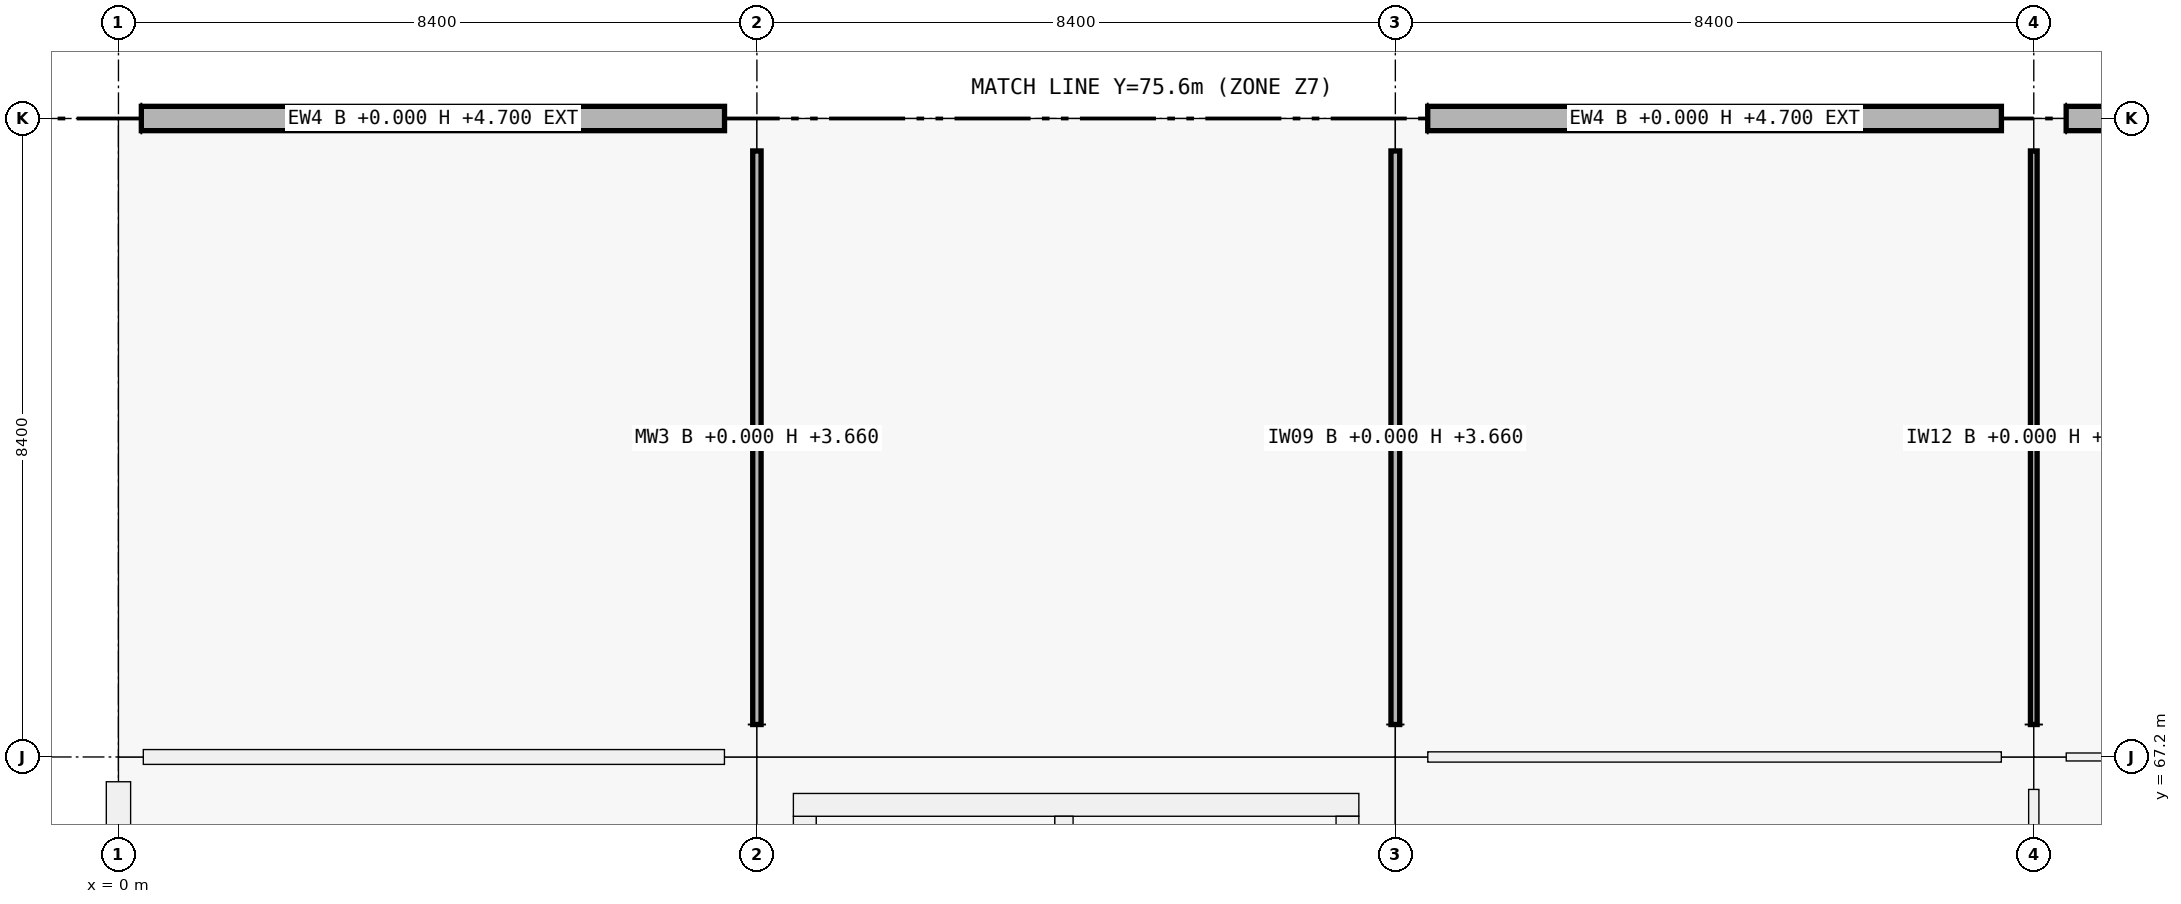
"""IFC4 building model, lengths in metres.
Left out: names, types, materials, properties, quantities, classifications, styles, units other than length and angle.
Written with IfcOpenShell. Run it as: python <this file> out.ifc"""

import sys

from ifc_helpers import new_model, si_unit, direction, frame, frame_2d, origin, origin_2d, place, context, subcontext, project, spatial, rectangle, extrude, element, fill, save


model = new_model("IFC4")
c1 = context("Model", 3, precision=1e-05, world=origin(), true_north=direction((0.0, 1.0)))
c2 = subcontext(c1, "Body", "Model", "MODEL_VIEW")
j1 = project(units=[si_unit("LENGTHUNIT", "METRE"), si_unit("PLANEANGLEUNIT", "RADIAN")], contexts=[c1])
p1 = place(None, origin())
s1 = spatial("IfcSite", under=j1, at=p1, CompositionType="ELEMENT")
p2 = place(p1, origin())
s2 = spatial("IfcBuilding", under=s1, at=p2, CompositionType="ELEMENT")
p3 = place(p2, origin())
s3 = spatial("IfcBuildingStorey", under=s2, at=p3, CompositionType="ELEMENT", Elevation=0.0)
p4 = place(p3, frame((0.0, 67.2, 0.0), z_axis=(0.0, 0.0, 1.0), x_axis=(1.0, 0.0, 0.0)))
e1 = element("IfcColumn", 1, at=p4, inside=s3, PredefinedType="COLUMN", context=c2, shape_type="SweptSolid", body=[
    extrude(rectangle(XDim=0.65, YDim=0.65, at=origin_2d()), origin(), (0.0, 0.0, 1.0), 5.76),
])
p5 = place(p3, frame((0.0, 75.6, 0.0), z_axis=(0.0, 0.0, 1.0), x_axis=(1.0, 0.0, 0.0)))
e2 = element("IfcColumn", 2, at=p5, inside=s3, PredefinedType="COLUMN", context=c2, shape_type="SweptSolid", body=[
    extrude(rectangle(XDim=0.6, YDim=0.6, at=origin_2d()), origin(), (0.0, 0.0, 1.0), 5.76),
])
for number, where, z_axis, x_axis in (
    (3, (8.4, 67.2, 0.0), (0.0, 0.0, 1.0), (1.0, 0.0, 0.0)),
    (4, (8.4, 75.6, 0.0), (0.0, 0.0, 1.0), (1.0, 0.0, 0.0)),
    (5, (16.8, 67.2, 0.0), (0.0, 0.0, 1.0), (1.0, 0.0, 0.0)),
    (6, (16.8, 75.6, 0.0), (0.0, 0.0, 1.0), (1.0, 0.0, 0.0)),
    (7, (25.2, 67.2, 0.0), (0.0, 0.0, 1.0), (1.0, 0.0, 0.0)),
    (8, (25.2, 75.6, 0.0), (0.0, 0.0, 1.0), (1.0, 0.0, 0.0)),
):
    element("IfcColumn", number, at=place(p3, frame(where, z_axis=z_axis, x_axis=x_axis)), inside=s3, PredefinedType="COLUMN", context=c2, shape_type="SweptSolid", body=[
        extrude(rectangle(XDim=0.85, YDim=0.85, at=origin_2d()), origin(), (0.0, 0.0, 1.0), 5.76),
    ])
p6 = place(p3, frame((0.0, 59.101, 0.0), z_axis=(0.0, 0.0, 1.0), x_axis=(0.0, 1.0, 0.0)))
e9 = element("IfcWall", 9, at=p6, inside=s3, PredefinedType="SOLIDWALL", context=c2, shape_type="SweptSolid", body=[
    extrude(rectangle(XDim=7.773, YDim=0.32, at=frame_2d((3.886, 0.0))), origin(), (0.0, 0.0, 1.0), 4.7),
])
p7 = place(p6, frame((3.136, 0.0, 0.9)))
e10 = element("IfcOpeningElement", 10, at=p7, cuts=e9, PredefinedType="OPENING", context=c2, shape_type="SweptSolid", body=[
    extrude(rectangle(XDim=1.5, YDim=1.8, at=frame_2d((0.75, 0.9))), frame((0.0, 0.16, 0.0), z_axis=(0.0, -1.0, 0.0), x_axis=(1.0, 0.0, 0.0)), (0.0, 0.0, 1.0), 0.32),
])
p8 = place(p6, frame((0.149, 0.0, 0.0)))
e11 = element("IfcOpeningElement", 11, at=p8, cuts=e9, PredefinedType="OPENING", context=c2, shape_type="SweptSolid", body=[
    extrude(rectangle(XDim=2.0, YDim=2.25, at=frame_2d((1.0, 1.125))), frame((0.0, 0.16, 0.0), z_axis=(0.0, -1.0, 0.0), x_axis=(1.0, 0.0, 0.0)), (0.0, 0.0, 1.0), 0.32),
])
p9 = place(p3, frame((0.301, 75.6, 0.0), z_axis=(0.0, 0.0, 1.0), x_axis=(1.0, 0.0, 0.0)))
e12 = element("IfcWall", 12, at=p9, inside=s3, PredefinedType="SOLIDWALL", context=c2, shape_type="SweptSolid", body=[
    extrude(rectangle(XDim=7.673, YDim=0.32, at=frame_2d((3.836, 0.0))), origin(), (0.0, 0.0, 1.0), 4.7),
])
p10 = place(p9, frame((3.037, 0.0, 0.9)))
e13 = element("IfcOpeningElement", 13, at=p10, cuts=e12, PredefinedType="OPENING", context=c2, shape_type="SweptSolid", body=[
    extrude(rectangle(XDim=1.6, YDim=2.1, at=frame_2d((0.8, 1.05))), frame((0.0, 0.16, 0.0), z_axis=(0.0, -1.0, 0.0), x_axis=(1.0, 0.0, 0.0)), (0.0, 0.0, 1.0), 0.32),
])
p11 = place(p3, frame((17.226, 75.6, 0.0), z_axis=(0.0, 0.0, 1.0), x_axis=(1.0, 0.0, 0.0)))
e14 = element("IfcWall", 14, at=p11, inside=s3, PredefinedType="SOLIDWALL", context=c2, shape_type="SweptSolid", body=[
    extrude(rectangle(XDim=7.548, YDim=0.32, at=frame_2d((3.774, 0.0))), origin(), (0.0, 0.0, 1.0), 4.7),
])
p12 = place(p11, frame((2.474, 0.0, 0.9)))
e15 = element("IfcOpeningElement", 15, at=p12, cuts=e14, PredefinedType="OPENING", context=c2, shape_type="SweptSolid", body=[
    extrude(rectangle(XDim=2.6, YDim=2.1, at=frame_2d((1.3, 1.05))), frame((0.0, 0.16, 0.0), z_axis=(0.0, -1.0, 0.0), x_axis=(1.0, 0.0, 0.0)), (0.0, 0.0, 1.0), 0.32),
])
p13 = place(p3, frame((25.626, 75.6, 0.0), z_axis=(0.0, 0.0, 1.0), x_axis=(1.0, 0.0, 0.0)))
e16 = element("IfcWall", 16, at=p13, inside=s3, PredefinedType="SOLIDWALL", context=c2, shape_type="SweptSolid", body=[
    extrude(rectangle(XDim=7.548, YDim=0.32, at=frame_2d((3.774, 0.0))), origin(), (0.0, 0.0, 1.0), 4.7),
])
p14 = place(p13, frame((2.374, 0.0, 0.9)))
e17 = element("IfcOpeningElement", 17, at=p14, cuts=e16, PredefinedType="OPENING", context=c2, shape_type="SweptSolid", body=[
    extrude(rectangle(XDim=2.8, YDim=1.75, at=frame_2d((1.4, 0.875))), frame((0.0, 0.16, 0.0), z_axis=(0.0, -1.0, 0.0), x_axis=(1.0, 0.0, 0.0)), (0.0, 0.0, 1.0), 0.32),
])
p15 = place(p3, frame((9.03, 59.58, 0.0), z_axis=(0.0, 0.0, 1.0), x_axis=(0.0, 1.0, 0.0)))
e18 = element("IfcWall", 18, at=p15, inside=s3, PredefinedType="SHEAR", context=c2, shape_type="SweptSolid", body=[
    extrude(rectangle(XDim=6.84, YDim=0.3, at=frame_2d((3.42, 0.0))), origin(), (0.0, 0.0, 1.0), 5.76),
])
p16 = place(p15, frame((0.12, 0.0, 0.0)))
e19 = element("IfcOpeningElement", 19, at=p16, cuts=e18, PredefinedType="OPENING", context=c2, shape_type="SweptSolid", body=[
    extrude(rectangle(XDim=1.0, YDim=2.15, at=frame_2d((0.5, 1.075))), frame((0.0, 0.15, 0.0), z_axis=(0.0, -1.0, 0.0), x_axis=(1.0, 0.0, 0.0)), (0.0, 0.0, 1.0), 0.3),
])
p17 = place(p3, frame((8.88, 66.57, 0.0), z_axis=(0.0, 0.0, 1.0), x_axis=(1.0, 0.0, 0.0)))
e20 = element("IfcWall", 20, at=p17, inside=s3, PredefinedType="SHEAR", context=c2, shape_type="SweptSolid", body=[
    extrude(rectangle(XDim=7.44, YDim=0.3, at=frame_2d((3.72, 0.0))), origin(), (0.0, 0.0, 1.0), 5.76),
])
p18 = place(p3, frame((16.17, 66.42, 0.0), z_axis=(0.0, 0.0, 1.0), x_axis=(0.0, -1.0, 0.0)))
e21 = element("IfcWall", 21, at=p18, inside=s3, PredefinedType="SHEAR", context=c2, shape_type="SweptSolid", body=[
    extrude(rectangle(XDim=6.84, YDim=0.3, at=frame_2d((3.42, 0.0))), origin(), (0.0, 0.0, 1.0), 5.76),
])
p19 = place(p3, frame((12.44, 59.58, 0.0), z_axis=(0.0, 0.0, 1.0), x_axis=(0.0, 1.0, 0.0)))
e22 = element("IfcWall", 22, at=p19, inside=s3, PredefinedType="SHEAR", context=c2, shape_type="SweptSolid", body=[
    extrude(rectangle(XDim=6.84, YDim=0.24, at=frame_2d((3.42, 0.0))), origin(), (0.0, 0.0, 1.0), 5.76),
])
p20 = place(p19, frame((0.12, 0.0, 0.0)))
e23 = element("IfcOpeningElement", 23, at=p20, cuts=e22, PredefinedType="OPENING", context=c2, shape_type="SweptSolid", body=[
    extrude(rectangle(XDim=1.0, YDim=2.15, at=frame_2d((0.5, 1.075))), frame((0.0, 0.12, 0.0), z_axis=(0.0, -1.0, 0.0), x_axis=(1.0, 0.0, 0.0)), (0.0, 0.0, 1.0), 0.24),
])
p21 = place(p3, frame((0.327, 67.2, 0.0), z_axis=(0.0, 0.0, 1.0), x_axis=(1.0, 0.0, 0.0)))
e24 = element("IfcWall", 24, at=p21, inside=s3, PredefinedType="PARTITIONING", context=c2, shape_type="SweptSolid", body=[
    extrude(rectangle(XDim=7.646, YDim=0.195, at=frame_2d((3.823, 0.0))), origin(), (0.0, 0.0, 1.0), 3.66),
])
p22 = place(p21, frame((3.313, 0.0, 0.0)))
e25 = element("IfcOpeningElement", 25, at=p22, cuts=e24, PredefinedType="OPENING", context=c2, shape_type="SweptSolid", body=[
    extrude(rectangle(XDim=1.02, YDim=2.2, at=frame_2d((0.51, 1.1))), frame((0.0, 0.098, 0.0), z_axis=(0.0, -1.0, 0.0), x_axis=(1.0, 0.0, 0.0)), (0.0, 0.0, 1.0), 0.195),
])
p23 = place(p3, frame((17.227, 67.2, 0.0), z_axis=(0.0, 0.0, 1.0), x_axis=(1.0, 0.0, 0.0)))
e26 = element("IfcWall", 26, at=p23, inside=s3, PredefinedType="PARTITIONING", context=c2, shape_type="SweptSolid", body=[
    extrude(rectangle(XDim=7.546, YDim=0.135, at=frame_2d((3.773, 0.0))), origin(), (0.0, 0.0, 1.0), 3.66),
])
p24 = place(p23, frame((3.283, 0.0, 0.0)))
e27 = element("IfcOpeningElement", 27, at=p24, cuts=e26, PredefinedType="OPENING", context=c2, shape_type="SweptSolid", body=[
    extrude(rectangle(XDim=0.98, YDim=2.18, at=frame_2d((0.49, 1.09))), frame((0.0, 0.067, 0.0), z_axis=(0.0, -1.0, 0.0), x_axis=(1.0, 0.0, 0.0)), (0.0, 0.0, 1.0), 0.135),
])
p25 = place(p3, frame((25.627, 67.2, 0.0), z_axis=(0.0, 0.0, 1.0), x_axis=(1.0, 0.0, 0.0)))
e28 = element("IfcWall", 28, at=p25, inside=s3, PredefinedType="PARTITIONING", context=c2, shape_type="SweptSolid", body=[
    extrude(rectangle(XDim=7.546, YDim=0.105, at=frame_2d((3.773, 0.0))), origin(), (0.0, 0.0, 1.0), 3.66),
])
p26 = place(p25, frame((3.248, 0.0, 0.0)))
e29 = element("IfcOpeningElement", 29, at=p26, cuts=e28, PredefinedType="OPENING", context=c2, shape_type="SweptSolid", body=[
    extrude(rectangle(XDim=1.05, YDim=2.12, at=frame_2d((0.525, 1.06))), frame((0.0, 0.052, 0.0), z_axis=(0.0, -1.0, 0.0), x_axis=(1.0, 0.0, 0.0)), (0.0, 0.0, 1.0), 0.105),
])
p27 = place(p3, frame((8.4, 67.627, 0.0), z_axis=(0.0, 0.0, 1.0), x_axis=(0.0, 1.0, 0.0)))
e30 = element("IfcWall", 30, at=p27, inside=s3, PredefinedType="MOVABLE", context=c2, shape_type="SweptSolid", body=[
    extrude(rectangle(XDim=7.546, YDim=0.11, at=frame_2d((3.773, 0.0))), origin(), (0.0, 0.0, 1.0), 3.66),
])
p28 = place(p27, frame((3.273, 0.0, 0.0)))
e31 = element("IfcOpeningElement", 31, at=p28, cuts=e30, PredefinedType="OPENING", context=c2, shape_type="SweptSolid", body=[
    extrude(rectangle(XDim=1.0, YDim=2.2, at=frame_2d((0.5, 1.1))), frame((0.0, 0.055, 0.0), z_axis=(0.0, -1.0, 0.0), x_axis=(1.0, 0.0, 0.0)), (0.0, 0.0, 1.0), 0.11),
])
p29 = place(p3, frame((16.8, 67.627, 0.0), z_axis=(0.0, 0.0, 1.0), x_axis=(0.0, 1.0, 0.0)))
e32 = element("IfcWall", 32, at=p29, inside=s3, PredefinedType="PARTITIONING", context=c2, shape_type="SweptSolid", body=[
    extrude(rectangle(XDim=7.546, YDim=0.115, at=frame_2d((3.773, 0.0))), origin(), (0.0, 0.0, 1.0), 3.66),
])
p30 = place(p29, frame((3.248, 0.0, 0.0)))
e33 = element("IfcOpeningElement", 33, at=p30, cuts=e32, PredefinedType="OPENING", context=c2, shape_type="SweptSolid", body=[
    extrude(rectangle(XDim=1.05, YDim=2.12, at=frame_2d((0.525, 1.06))), frame((0.0, 0.058, 0.0), z_axis=(0.0, -1.0, 0.0), x_axis=(1.0, 0.0, 0.0)), (0.0, 0.0, 1.0), 0.115),
])
p31 = place(p3, frame((25.2, 59.227, 0.0), z_axis=(0.0, 0.0, 1.0), x_axis=(0.0, 1.0, 0.0)))
e34 = element("IfcWall", 34, at=p31, inside=s3, PredefinedType="PARTITIONING", context=c2, shape_type="SweptSolid", body=[
    extrude(rectangle(XDim=7.546, YDim=0.135, at=frame_2d((3.773, 0.0))), origin(), (0.0, 0.0, 1.0), 3.66),
])
p32 = place(p31, frame((3.313, 0.0, 0.0)))
e35 = element("IfcOpeningElement", 35, at=p32, cuts=e34, PredefinedType="OPENING", context=c2, shape_type="SweptSolid", body=[
    extrude(rectangle(XDim=0.92, YDim=2.15, at=frame_2d((0.46, 1.075))), frame((0.0, 0.067, 0.0), z_axis=(0.0, -1.0, 0.0), x_axis=(1.0, 0.0, 0.0)), (0.0, 0.0, 1.0), 0.135),
])
p33 = place(p3, frame((25.2, 67.627, 0.0), z_axis=(0.0, 0.0, 1.0), x_axis=(0.0, 1.0, 0.0)))
e36 = element("IfcWall", 36, at=p33, inside=s3, PredefinedType="PARTITIONING", context=c2, shape_type="SweptSolid", body=[
    extrude(rectangle(XDim=7.546, YDim=0.088, at=frame_2d((3.773, 0.0))), origin(), (0.0, 0.0, 1.0), 3.66),
])
p34 = place(p33, frame((3.288, 0.0, 0.0)))
e37 = element("IfcOpeningElement", 37, at=p34, cuts=e36, PredefinedType="OPENING", context=c2, shape_type="SweptSolid", body=[
    extrude(rectangle(XDim=0.97, YDim=2.12, at=frame_2d((0.485, 1.06))), frame((0.0, 0.044, 0.0), z_axis=(0.0, -1.0, 0.0), x_axis=(1.0, 0.0, 0.0)), (0.0, 0.0, 1.0), 0.088),
])
p35 = place(p10, origin())
e38 = element("IfcWindow", 38, at=p35, inside=s3, PartitioningType="SINGLE_PANEL", PredefinedType="WINDOW", context=c2, shape_type="SweptSolid", body=[
    extrude(rectangle(XDim=1.6, YDim=2.1, at=frame_2d((0.8, 1.05))), frame((0.0, 0.03, 0.0), z_axis=(0.0, -1.0, 0.0), x_axis=(1.0, 0.0, 0.0)), (0.0, 0.0, 1.0), 0.06),
])
fill(e13, e38)
p36 = place(p12, origin())
e39 = element("IfcWindow", 39, at=p36, inside=s3, PartitioningType="SINGLE_PANEL", PredefinedType="WINDOW", context=c2, shape_type="SweptSolid", body=[
    extrude(rectangle(XDim=2.6, YDim=2.1, at=frame_2d((1.3, 1.05))), frame((0.0, 0.03, 0.0), z_axis=(0.0, -1.0, 0.0), x_axis=(1.0, 0.0, 0.0)), (0.0, 0.0, 1.0), 0.06),
])
fill(e15, e39)
p37 = place(p24, origin())
e40 = element("IfcDoor", 40, at=p37, inside=s3, OperationType="SINGLE_SWING_RIGHT", PredefinedType="DOOR", context=c2, shape_type="SweptSolid", body=[
    extrude(rectangle(XDim=0.98, YDim=2.18, at=frame_2d((0.49, 1.09))), frame((0.0, 0.025, 0.0), z_axis=(0.0, -1.0, 0.0), x_axis=(1.0, 0.0, 0.0)), (0.0, 0.0, 1.0), 0.05),
])
fill(e27, e40)
p38 = place(p22, origin())
e41 = element("IfcDoor", 41, at=p38, inside=s3, OperationType="SINGLE_SWING_LEFT", PredefinedType="DOOR", context=c2, shape_type="SweptSolid", body=[
    extrude(rectangle(XDim=1.02, YDim=2.2, at=frame_2d((0.51, 1.1))), frame((0.0, 0.025, 0.0), z_axis=(0.0, -1.0, 0.0), x_axis=(1.0, 0.0, 0.0)), (0.0, 0.0, 1.0), 0.05),
])
fill(e25, e41)
p39 = place(p28, origin())
e42 = element("IfcDoor", 42, at=p39, inside=s3, OperationType="SINGLE_SWING_RIGHT", PredefinedType="DOOR", context=c2, shape_type="SweptSolid", body=[
    extrude(rectangle(XDim=1.0, YDim=2.2, at=frame_2d((0.5, 1.1))), frame((0.0, 0.025, 0.0), z_axis=(0.0, -1.0, 0.0), x_axis=(1.0, 0.0, 0.0)), (0.0, 0.0, 1.0), 0.05),
])
fill(e31, e42)
p40 = place(p30, origin())
e43 = element("IfcDoor", 43, at=p40, inside=s3, OperationType="SINGLE_SWING_RIGHT", PredefinedType="DOOR", context=c2, shape_type="SweptSolid", body=[
    extrude(rectangle(XDim=1.05, YDim=2.12, at=frame_2d((0.525, 1.06))), frame((0.0, 0.025, 0.0), z_axis=(0.0, -1.0, 0.0), x_axis=(1.0, 0.0, 0.0)), (0.0, 0.0, 1.0), 0.05),
])
fill(e33, e43)
p41 = place(p34, origin())
e44 = element("IfcDoor", 44, at=p41, inside=s3, OperationType="SINGLE_SWING_RIGHT", PredefinedType="DOOR", context=c2, shape_type="SweptSolid", body=[
    extrude(rectangle(XDim=0.97, YDim=2.12, at=frame_2d((0.485, 1.06))), frame((0.0, 0.025, 0.0), z_axis=(0.0, -1.0, 0.0), x_axis=(1.0, 0.0, 0.0)), (0.0, 0.0, 1.0), 0.05),
])
fill(e37, e44)
save(model, sys.argv[1])
